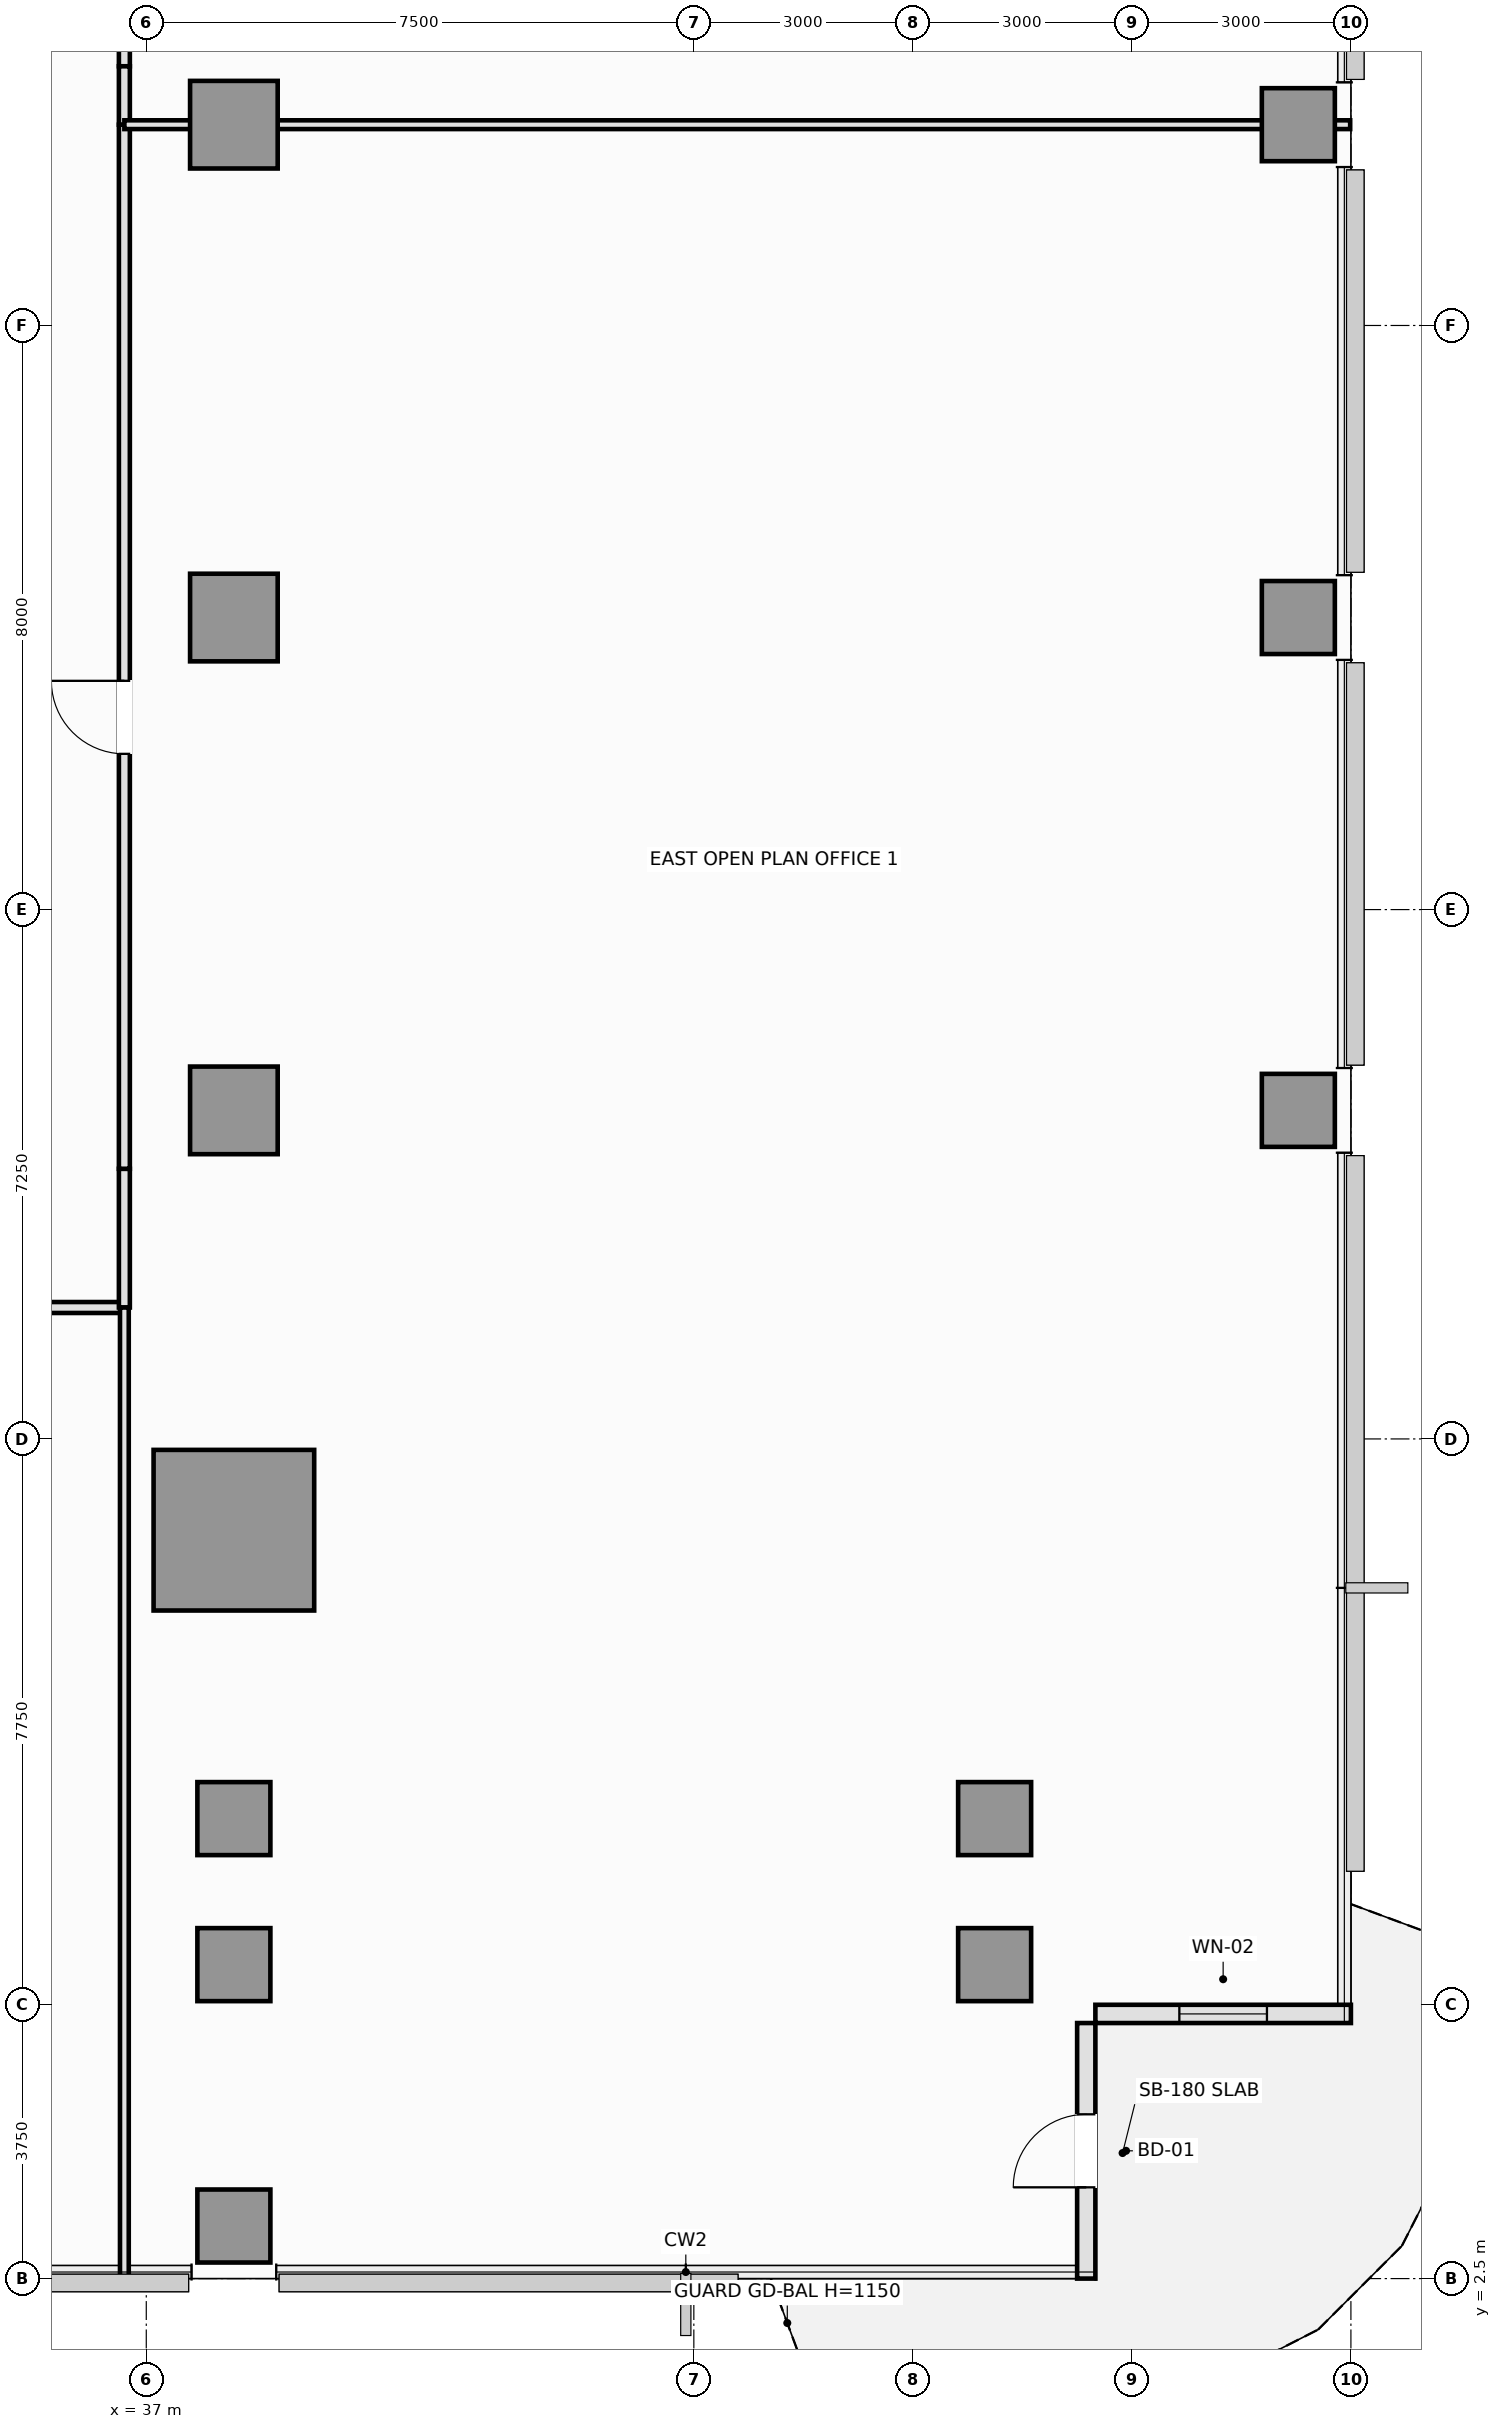
"""IFC4 building model, lengths in metres.
Left out: names, types, materials, properties, quantities, classifications, styles, units other than length and angle.
Written with IfcOpenShell. Run it as: python <this file> out.ifc"""

import sys

from ifc_helpers import new_model, si_unit, direction, frame, frame_2d, origin, origin_2d, place, context, subcontext, project, spatial, rectangle, extrude, element, fill, save


model = new_model("IFC4")
c1 = context("Model", 3, precision=1e-05, world=origin(), true_north=direction((0.0, 1.0)))
c2 = subcontext(c1, "Body", "Model", "MODEL_VIEW")
j1 = project(units=[si_unit("LENGTHUNIT", "METRE"), si_unit("PLANEANGLEUNIT", "RADIAN")], contexts=[c1])
p1 = place(None, origin())
s1 = spatial("IfcSite", under=j1, at=p1, CompositionType="ELEMENT")
p2 = place(p1, origin())
s2 = spatial("IfcBuilding", under=s1, at=p2, CompositionType="ELEMENT")
p3 = place(p2, frame((0.0, 0.0, 68.2)))
s3 = spatial("IfcBuildingStorey", under=s2, at=p3, CompositionType="ELEMENT", Elevation=68.2)
p4 = place(p3, frame((38.2, 12.75, 0.0), z_axis=(0.0, 0.0, 1.0), x_axis=(1.0, 0.0, 0.0)))
e1 = element("IfcColumn", 1, at=p4, inside=s3, PredefinedType="COLUMN", context=c2, shape_type="SweptSolid", body=[
    extrude(rectangle(XDim=2.2, YDim=2.2, at=origin_2d()), origin(), (0.0, 0.0, 1.0), 3.55),
])
for number, where, z_axis, x_axis in (
    (2, (38.2, 18.5, 0.0), (0.0, 0.0, 1.0), (1.0, 0.0, 0.0)),
    (3, (38.2, 25.25, 0.0), (0.0, 0.0, 1.0), (1.0, 0.0, 0.0)),
    (4, (38.2, 32.0, 0.0), (0.0, 0.0, 1.0), (1.0, 0.0, 0.0)),
):
    element("IfcColumn", number, at=place(p3, frame(where, z_axis=z_axis, x_axis=x_axis)), inside=s3, PredefinedType="COLUMN", context=c2, shape_type="SweptSolid", body=[
        extrude(rectangle(XDim=1.2, YDim=1.2, at=origin_2d()), origin(), (0.0, 0.0, 1.0), 3.55),
    ])
for number, where, z_axis, x_axis in (
    (5, (48.62, 6.8, 0.0), (0.0, 0.0, 1.0), (1.0, 0.0, 0.0)),
    (6, (38.2, 6.8, 0.0), (0.0, 0.0, 1.0), (1.0, 0.0, 0.0)),
    (7, (38.2, 8.8, 0.0), (0.0, 0.0, 1.0), (1.0, 0.0, 0.0)),
    (8, (48.62, 8.8, 0.0), (0.0, 0.0, 1.0), (1.0, 0.0, 0.0)),
    (9, (52.78, 18.5, 0.0), (0.0, 0.0, 1.0), (1.0, 0.0, 0.0)),
    (10, (52.78, 25.25, 0.0), (0.0, 0.0, 1.0), (1.0, 0.0, 0.0)),
    (11, (52.78, 32.0, 0.0), (0.0, 0.0, 1.0), (1.0, 0.0, 0.0)),
    (12, (38.2, 3.22, 0.0), (0.0, 0.0, 1.0), (1.0, 0.0, 0.0)),
):
    element("IfcColumn", number, at=place(p3, frame(where, z_axis=z_axis, x_axis=x_axis)), inside=s3, PredefinedType="COLUMN", context=c2, shape_type="SweptSolid", body=[
        extrude(rectangle(XDim=1.0, YDim=1.0, at=origin_2d()), origin(), (0.0, 0.0, 1.0), 3.55),
    ])
p5 = place(p3, frame((49.875, 2.5, 0.0), z_axis=(0.0, 0.0, 1.0), x_axis=(0.0, 1.0, 0.0)))
e13 = element("IfcWall", 13, at=p5, inside=s3, PredefinedType="SOLIDWALL", context=c2, shape_type="SweptSolid", body=[
    extrude(rectangle(XDim=3.5, YDim=0.25, at=frame_2d((1.75, 0.0))), origin(), (0.0, 0.0, 1.0), 3.07),
])
p6 = place(p5, frame((1.25, 0.0, 0.0)))
e14 = element("IfcOpeningElement", 14, at=p6, cuts=e13, PredefinedType="OPENING", context=c2, shape_type="SweptSolid", body=[
    extrude(rectangle(XDim=1.0, YDim=2.2, at=frame_2d((0.5, 1.1))), frame((0.0, 0.135, 0.0), z_axis=(0.0, -1.0, 0.0), x_axis=(1.0, 0.0, 0.0)), (0.0, 0.0, 1.0), 0.27),
])
p7 = place(p3, frame((50.0, 6.125, 0.0), z_axis=(0.0, 0.0, 1.0), x_axis=(1.0, 0.0, 0.0)))
e15 = element("IfcWall", 15, at=p7, inside=s3, PredefinedType="SOLIDWALL", context=c2, shape_type="SweptSolid", body=[
    extrude(rectangle(XDim=3.5, YDim=0.25, at=frame_2d((1.75, 0.0))), origin(), (0.0, 0.0, 1.0), 3.07),
])
p8 = place(p7, frame((1.15, 0.0, 0.9)))
e16 = element("IfcOpeningElement", 16, at=p8, cuts=e15, PredefinedType="OPENING", context=c2, shape_type="SweptSolid", body=[
    extrude(rectangle(XDim=1.2, YDim=1.8, at=frame_2d((0.6, 0.9))), frame((0.0, 0.135, 0.0), z_axis=(0.0, -1.0, 0.0), x_axis=(1.0, 0.0, 0.0)), (0.0, 0.0, 1.0), 0.27),
])
p9 = place(p3, frame((31.8, 15.8, 0.0), z_axis=(0.0, 0.0, 1.0), x_axis=(1.0, 0.0, 0.0)))
e17 = element("IfcWall", 17, at=p9, inside=s3, PredefinedType="PARTITIONING", context=c2, shape_type="SweptSolid", body=[
    extrude(rectangle(XDim=4.9, YDim=0.15, at=frame_2d((2.45, 0.0))), origin(), (0.0, 0.0, 1.0), 3.37),
])
p10 = place(p9, frame((1.95, 0.0, 0.0)))
e18 = element("IfcOpeningElement", 18, at=p10, cuts=e17, PredefinedType="OPENING", context=c2, shape_type="SweptSolid", body=[
    extrude(rectangle(XDim=1.0, YDim=2.15, at=frame_2d((0.5, 1.075))), frame((0.0, 0.085, 0.0), z_axis=(0.0, -1.0, 0.0), x_axis=(1.0, 0.0, 0.0)), (0.0, 0.0, 1.0), 0.17),
])
p11 = place(p3, frame((36.7, 15.8, 0.0), z_axis=(0.0, 0.0, 1.0), x_axis=(0.0, 1.0, 0.0)))
e19 = element("IfcWall", 19, at=p11, inside=s3, PredefinedType="PARTITIONING", context=c2, shape_type="SweptSolid", body=[
    extrude(rectangle(XDim=1.9, YDim=0.15, at=frame_2d((0.95, 0.0))), origin(), (0.0, 0.0, 1.0), 3.37),
])
p12 = place(p3, frame((36.7, 32.8, 0.0), z_axis=(0.0, 0.0, 1.0), x_axis=(0.0, 1.0, 0.0)))
e20 = element("IfcWall", 20, at=p12, inside=s3, PredefinedType="PARTITIONING", context=c2, shape_type="SweptSolid", body=[
    extrude(rectangle(XDim=1.9, YDim=0.15, at=frame_2d((0.95, 0.0))), origin(), (0.0, 0.0, 1.0), 3.37),
])
p13 = place(p12, frame((0.5, 0.0, 0.0)))
e21 = element("IfcOpeningElement", 21, at=p13, cuts=e20, PredefinedType="OPENING", context=c2, shape_type="SweptSolid", body=[
    extrude(rectangle(XDim=0.9, YDim=2.1, at=frame_2d((0.45, 1.05))), frame((0.0, 0.085, 0.0), z_axis=(0.0, -1.0, 0.0), x_axis=(1.0, 0.0, 0.0)), (0.0, 0.0, 1.0), 0.17),
])
p14 = place(p3, frame((36.7, 17.7, 0.0), z_axis=(0.0, 0.0, 1.0), x_axis=(0.0, 1.0, 0.0)))
e22 = element("IfcWall", 22, at=p14, inside=s3, PredefinedType="PARTITIONING", context=c2, shape_type="SweptSolid", body=[
    extrude(rectangle(XDim=14.3, YDim=0.15, at=frame_2d((7.15, 0.0))), origin(), (0.0, 0.0, 1.0), 3.37),
])
p15 = place(p14, frame((5.683, 0.0, 0.0)))
e23 = element("IfcOpeningElement", 23, at=p15, cuts=e22, PredefinedType="OPENING", context=c2, shape_type="SweptSolid", body=[
    extrude(rectangle(XDim=1.0, YDim=2.15, at=frame_2d((0.5, 1.075))), frame((0.0, 0.085, 0.0), z_axis=(0.0, -1.0, 0.0), x_axis=(1.0, 0.0, 0.0)), (0.0, 0.0, 1.0), 0.17),
])
p16 = place(p3, frame((36.7, 32.0, 0.0), z_axis=(0.0, 0.0, 1.0), x_axis=(0.0, 1.0, 0.0)))
e24 = element("IfcWall", 24, at=p16, inside=s3, PredefinedType="PARTITIONING", context=c2, shape_type="SweptSolid", body=[
    extrude(rectangle(XDim=0.8, YDim=0.15, at=frame_2d((0.4, 0.0))), origin(), (0.0, 0.0, 1.0), 3.37),
])
p17 = place(p3, frame((36.7, 2.51, 0.0), z_axis=(0.0, 0.0, 1.0), x_axis=(0.0, 1.0, 0.0)))
e25 = element("IfcWall", 25, at=p17, inside=s3, PredefinedType="PARTITIONING", context=c2, shape_type="SweptSolid", body=[
    extrude(rectangle(XDim=13.29, YDim=0.12, at=frame_2d((6.645, 0.0))), origin(), (0.0, 0.0, 1.0), 3.37),
])
p18 = place(p3, frame((36.7, 32.0, 0.0), z_axis=(0.0, 0.0, 1.0), x_axis=(1.0, 0.0, 0.0)))
e26 = element("IfcWall", 26, at=p18, inside=s3, PredefinedType="PARTITIONING", context=c2, shape_type="SweptSolid", body=[
    extrude(rectangle(XDim=16.79, YDim=0.12, at=frame_2d((8.395, 0.0))), origin(), (0.0, 0.0, 1.0), 2.72),
])
p19 = place(p6, frame((1.0, 0.0, 0.0), z_axis=(0.0, 0.0, 1.0), x_axis=(-1.0, 0.0, 0.0)))
e27 = element("IfcDoor", 27, at=p19, inside=s3, OperationType="SINGLE_SWING_LEFT", PredefinedType="DOOR", context=c2, shape_type="SweptSolid", body=[
    extrude(rectangle(XDim=1.0, YDim=2.2, at=frame_2d((0.5, 1.1))), frame((0.0, 0.025, 0.0), z_axis=(0.0, -1.0, 0.0), x_axis=(1.0, 0.0, 0.0)), (0.0, 0.0, 1.0), 0.05),
])
fill(e14, e27)
p20 = place(p8, origin())
e28 = element("IfcWindow", 28, at=p20, inside=s3, PartitioningType="SINGLE_PANEL", PredefinedType="WINDOW", context=c2, shape_type="SweptSolid", body=[
    extrude(rectangle(XDim=1.2, YDim=1.8, at=frame_2d((0.6, 0.9))), frame((0.0, 0.03, 0.0), z_axis=(0.0, -1.0, 0.0), x_axis=(1.0, 0.0, 0.0)), (0.0, 0.0, 1.0), 0.06),
])
fill(e16, e28)
p21 = place(p15, origin())
e29 = element("IfcDoor", 29, at=p21, inside=s3, OperationType="SINGLE_SWING_RIGHT", PredefinedType="DOOR", context=c2, shape_type="SweptSolid", body=[
    extrude(rectangle(XDim=1.0, YDim=2.15, at=frame_2d((0.5, 1.075))), frame((0.0, 0.025, 0.0), z_axis=(0.0, -1.0, 0.0), x_axis=(1.0, 0.0, 0.0)), (0.0, 0.0, 1.0), 0.05),
])
fill(e23, e29)
save(model, sys.argv[1])
